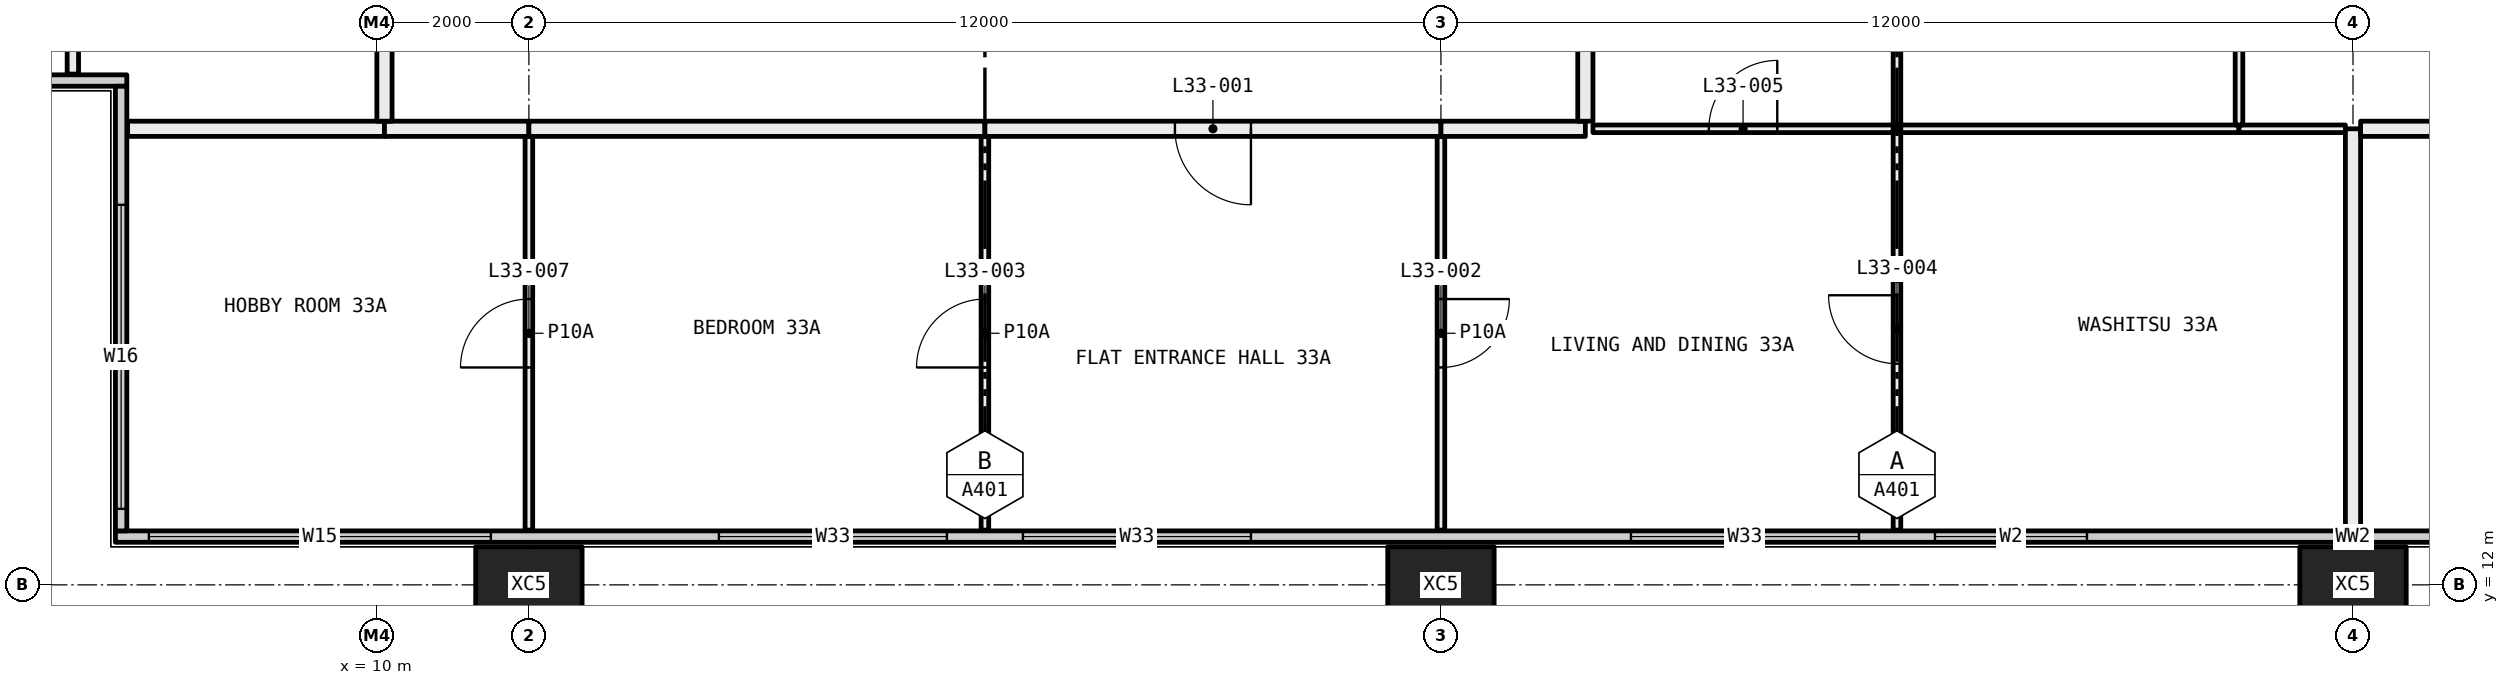
"""IFC4 building model, lengths in metres.
Left out: names, types, materials, properties, quantities, classifications, styles, units other than length and angle.
Written with IfcOpenShell. Run it as: python <this file> out.ifc"""

import sys

from ifc_helpers import new_model, si_unit, direction, frame, frame_2d, origin, origin_2d, place, context, subcontext, project, spatial, rectangle, hollow_rectangle, extrude, element, fill, save


model = new_model("IFC4")
c1 = context("Model", 3, precision=1e-05, world=origin(), true_north=direction((0.0, 1.0)))
c2 = subcontext(c1, "Body", "Model", "MODEL_VIEW")
j1 = project(units=[si_unit("LENGTHUNIT", "METRE"), si_unit("PLANEANGLEUNIT", "RADIAN")], contexts=[c1])
p1 = place(None, origin())
s1 = spatial("IfcSite", under=j1, at=p1, CompositionType="ELEMENT")
p2 = place(p1, origin())
s2 = spatial("IfcBuilding", under=s1, at=p2, CompositionType="ELEMENT")
p3 = place(p2, frame((0.0, 0.0, 127.65)))
s3 = spatial("IfcBuildingStorey", under=s2, at=p3, CompositionType="ELEMENT", Elevation=127.65)
for number, where, z_axis, x_axis in (
    (1, (12.0, 12.0, -0.4), (0.0, 0.0, 1.0), (1.0, 0.0, 0.0)),
    (2, (24.0, 12.0, -0.4), (0.0, 0.0, 1.0), (1.0, 0.0, 0.0)),
    (3, (36.0, 12.0, -0.4), (0.0, 0.0, 1.0), (1.0, 0.0, 0.0)),
):
    element("IfcColumn", number, at=place(p3, frame(where, z_axis=z_axis, x_axis=x_axis)), inside=s3, PredefinedType="COLUMN", context=c2, shape_type="SweptSolid", body=[
        extrude(hollow_rectangle(XDim=1.4, YDim=1.0, WallThickness=0.055, at=origin_2d()), origin(), (0.0, 0.0, 1.0), 3.45),
    ])
p4 = place(p3, frame((6.56, 12.635, 0.0), z_axis=(0.0, 0.0, 1.0), x_axis=(1.0, 0.0, 0.0)))
e4 = element("IfcWall", 4, at=p4, inside=s3, PredefinedType="ELEMENTEDWALL", context=c2, shape_type="SweptSolid", body=[
    extrude(rectangle(XDim=58.88, YDim=0.15, at=frame_2d((29.44, 0.0))), origin(), (0.0, 0.0, 1.0), 3.05),
])
p5 = place(p4, frame((0.44, 0.0, 0.45)))
e5 = element("IfcOpeningElement", 5, at=p5, cuts=e4, PredefinedType="OPENING", context=c2, shape_type="SweptSolid", body=[
    extrude(rectangle(XDim=4.5, YDim=2.55, at=frame_2d((2.25, 1.275))), frame((0.0, 0.085, 0.0), z_axis=(0.0, -1.0, 0.0), x_axis=(1.0, 0.0, 0.0)), (0.0, 0.0, 1.0), 0.17),
])
p6 = place(p4, frame((7.94, 0.0, 0.45)))
e6 = element("IfcOpeningElement", 6, at=p6, cuts=e4, PredefinedType="OPENING", context=c2, shape_type="SweptSolid", body=[
    extrude(rectangle(XDim=3.0, YDim=2.55, at=frame_2d((1.5, 1.275))), frame((0.0, 0.085, 0.0), z_axis=(0.0, -1.0, 0.0), x_axis=(1.0, 0.0, 0.0)), (0.0, 0.0, 1.0), 0.17),
])
p7 = place(p4, frame((11.94, 0.0, 0.45)))
e7 = element("IfcOpeningElement", 7, at=p7, cuts=e4, PredefinedType="OPENING", context=c2, shape_type="SweptSolid", body=[
    extrude(rectangle(XDim=3.0, YDim=2.55, at=frame_2d((1.5, 1.275))), frame((0.0, 0.085, 0.0), z_axis=(0.0, -1.0, 0.0), x_axis=(1.0, 0.0, 0.0)), (0.0, 0.0, 1.0), 0.17),
])
p8 = place(p4, frame((19.94, 0.0, 0.45)))
e8 = element("IfcOpeningElement", 8, at=p8, cuts=e4, PredefinedType="OPENING", context=c2, shape_type="SweptSolid", body=[
    extrude(rectangle(XDim=3.0, YDim=2.55, at=frame_2d((1.5, 1.275))), frame((0.0, 0.085, 0.0), z_axis=(0.0, -1.0, 0.0), x_axis=(1.0, 0.0, 0.0)), (0.0, 0.0, 1.0), 0.17),
])
p9 = place(p4, frame((23.94, 0.0, 0.45)))
e9 = element("IfcOpeningElement", 9, at=p9, cuts=e4, PredefinedType="OPENING", context=c2, shape_type="SweptSolid", body=[
    extrude(rectangle(XDim=2.0, YDim=2.55, at=frame_2d((1.0, 1.275))), frame((0.0, 0.085, 0.0), z_axis=(0.0, -1.0, 0.0), x_axis=(1.0, 0.0, 0.0)), (0.0, 0.0, 1.0), 0.17),
])
p10 = place(p4, frame((31.94, 0.0, 0.45)))
e10 = element("IfcOpeningElement", 10, at=p10, cuts=e4, PredefinedType="OPENING", context=c2, shape_type="SweptSolid", body=[
    extrude(rectangle(XDim=3.0, YDim=2.55, at=frame_2d((1.5, 1.275))), frame((0.0, 0.085, 0.0), z_axis=(0.0, -1.0, 0.0), x_axis=(1.0, 0.0, 0.0)), (0.0, 0.0, 1.0), 0.17),
])
p11 = place(p4, frame((35.94, 0.0, 0.45)))
e11 = element("IfcOpeningElement", 11, at=p11, cuts=e4, PredefinedType="OPENING", context=c2, shape_type="SweptSolid", body=[
    extrude(rectangle(XDim=3.0, YDim=2.55, at=frame_2d((1.5, 1.275))), frame((0.0, 0.085, 0.0), z_axis=(0.0, -1.0, 0.0), x_axis=(1.0, 0.0, 0.0)), (0.0, 0.0, 1.0), 0.17),
])
p12 = place(p4, frame((43.94, 0.0, 0.45)))
e12 = element("IfcOpeningElement", 12, at=p12, cuts=e4, PredefinedType="OPENING", context=c2, shape_type="SweptSolid", body=[
    extrude(rectangle(XDim=3.0, YDim=2.55, at=frame_2d((1.5, 1.275))), frame((0.0, 0.085, 0.0), z_axis=(0.0, -1.0, 0.0), x_axis=(1.0, 0.0, 0.0)), (0.0, 0.0, 1.0), 0.17),
])
p13 = place(p4, frame((47.94, 0.0, 0.45)))
e13 = element("IfcOpeningElement", 13, at=p13, cuts=e4, PredefinedType="OPENING", context=c2, shape_type="SweptSolid", body=[
    extrude(rectangle(XDim=2.0, YDim=2.55, at=frame_2d((1.0, 1.275))), frame((0.0, 0.085, 0.0), z_axis=(0.0, -1.0, 0.0), x_axis=(1.0, 0.0, 0.0)), (0.0, 0.0, 1.0), 0.17),
])
p14 = place(p4, frame((53.94, 0.0, 0.45)))
e14 = element("IfcOpeningElement", 14, at=p14, cuts=e4, PredefinedType="OPENING", context=c2, shape_type="SweptSolid", body=[
    extrude(rectangle(XDim=4.5, YDim=2.55, at=frame_2d((2.25, 1.275))), frame((0.0, 0.085, 0.0), z_axis=(0.0, -1.0, 0.0), x_axis=(1.0, 0.0, 0.0)), (0.0, 0.0, 1.0), 0.17),
])
p15 = place(p3, frame((0.56, 18.635, 0.0), z_axis=(0.0, 0.0, 1.0), x_axis=(1.0, 0.0, 0.0)))
e15 = element("IfcWall", 15, at=p15, inside=s3, PredefinedType="ELEMENTEDWALL", context=c2, shape_type="SweptSolid", body=[
    extrude(rectangle(XDim=6.15, YDim=0.15, at=frame_2d((3.075, 0.0))), origin(), (0.0, 0.0, 1.0), 3.05),
])
p16 = place(p15, frame((0.44, 0.0, 0.45)))
e16 = element("IfcOpeningElement", 16, at=p16, cuts=e15, PredefinedType="OPENING", context=c2, shape_type="SweptSolid", body=[
    extrude(rectangle(XDim=4.0, YDim=2.55, at=frame_2d((2.0, 1.275))), frame((0.0, 0.085, 0.0), z_axis=(0.0, -1.0, 0.0), x_axis=(1.0, 0.0, 0.0)), (0.0, 0.0, 1.0), 0.17),
])
p17 = place(p3, frame((6.635, 12.71, 0.0), z_axis=(0.0, 0.0, 1.0), x_axis=(0.0, 1.0, 0.0)))
e17 = element("IfcWall", 17, at=p17, inside=s3, PredefinedType="ELEMENTEDWALL", context=c2, shape_type="SweptSolid", body=[
    extrude(rectangle(XDim=5.85, YDim=0.15, at=frame_2d((2.925, 0.0))), origin(), (0.0, 0.0, 1.0), 3.05),
])
p18 = place(p17, frame((0.29, 0.0, 0.45)))
e18 = element("IfcOpeningElement", 18, at=p18, cuts=e17, PredefinedType="OPENING", context=c2, shape_type="SweptSolid", body=[
    extrude(rectangle(XDim=4.0, YDim=2.55, at=frame_2d((2.0, 1.275))), frame((0.0, 0.085, 0.0), z_axis=(0.0, -1.0, 0.0), x_axis=(1.0, 0.0, 0.0)), (0.0, 0.0, 1.0), 0.17),
])
p19 = place(p3, frame((12.0, 12.72, 0.0), z_axis=(0.0, 0.0, 1.0), x_axis=(0.0, 1.0, 0.0)))
e19 = element("IfcWall", 19, at=p19, inside=s3, PredefinedType="PARTITIONING", context=c2, shape_type="SweptSolid", body=[
    extrude(rectangle(XDim=5.18, YDim=0.1, at=frame_2d((2.59, 0.0))), origin(), (0.0, 0.0, 1.0), 3.05),
])
p20 = place(p19, frame((2.14, 0.0, 0.0)))
e20 = element("IfcOpeningElement", 20, at=p20, cuts=e19, PredefinedType="OPENING", context=c2, shape_type="SweptSolid", body=[
    extrude(rectangle(XDim=0.9, YDim=2.1, at=frame_2d((0.45, 1.05))), frame((0.0, 0.06, 0.0), z_axis=(0.0, -1.0, 0.0), x_axis=(1.0, 0.0, 0.0)), (0.0, 0.0, 1.0), 0.12),
])
p21 = place(p3, frame((10.1, 18.0, 0.0), z_axis=(0.0, 0.0, 1.0), x_axis=(-1.0, 0.0, 0.0)))
e21 = element("IfcWall", 21, at=p21, inside=s3, PredefinedType="PARTITIONING", context=c2, shape_type="SweptSolid", body=[
    extrude(rectangle(XDim=3.38, YDim=0.2, at=frame_2d((1.69, 0.0))), origin(), (0.0, 0.0, 1.0), 3.05),
])
p22 = place(p3, frame((12.0, 18.0, 0.0), z_axis=(0.0, 0.0, 1.0), x_axis=(-1.0, 0.0, 0.0)))
e22 = element("IfcWall", 22, at=p22, inside=s3, PredefinedType="PARTITIONING", context=c2, shape_type="SweptSolid", body=[
    extrude(rectangle(XDim=1.9, YDim=0.2, at=frame_2d((0.95, 0.0))), origin(), (0.0, 0.0, 1.0), 3.05),
])
p23 = place(p3, frame((18.0, 12.72, 0.0), z_axis=(0.0, 0.0, 1.0), x_axis=(0.0, 1.0, 0.0)))
e23 = element("IfcWall", 23, at=p23, inside=s3, PredefinedType="PARTITIONING", context=c2, shape_type="SweptSolid", body=[
    extrude(rectangle(XDim=5.18, YDim=0.1, at=frame_2d((2.59, 0.0))), origin(), (0.0, 0.0, 1.0), 3.05),
])
p24 = place(p23, frame((2.14, 0.0, 0.0)))
e24 = element("IfcOpeningElement", 24, at=p24, cuts=e23, PredefinedType="OPENING", context=c2, shape_type="SweptSolid", body=[
    extrude(rectangle(XDim=0.9, YDim=2.1, at=frame_2d((0.45, 1.05))), frame((0.0, 0.06, 0.0), z_axis=(0.0, -1.0, 0.0), x_axis=(1.0, 0.0, 0.0)), (0.0, 0.0, 1.0), 0.12),
])
p25 = place(p3, frame((18.0, 18.0, 0.0), z_axis=(0.0, 0.0, 1.0), x_axis=(-1.0, 0.0, 0.0)))
e25 = element("IfcWall", 25, at=p25, inside=s3, PredefinedType="PARTITIONING", context=c2, shape_type="SweptSolid", body=[
    extrude(rectangle(XDim=6.0, YDim=0.2, at=frame_2d((3.0, 0.0))), origin(), (0.0, 0.0, 1.0), 3.05),
])
p26 = place(p3, frame((24.0, 12.72, 0.0), z_axis=(0.0, 0.0, 1.0), x_axis=(0.0, 1.0, 0.0)))
e26 = element("IfcWall", 26, at=p26, inside=s3, PredefinedType="PARTITIONING", context=c2, shape_type="SweptSolid", body=[
    extrude(rectangle(XDim=5.18, YDim=0.1, at=frame_2d((2.59, 0.0))), origin(), (0.0, 0.0, 1.0), 3.05),
])
p27 = place(p26, frame((2.14, 0.0, 0.0)))
e27 = element("IfcOpeningElement", 27, at=p27, cuts=e26, PredefinedType="OPENING", context=c2, shape_type="SweptSolid", body=[
    extrude(rectangle(XDim=0.9, YDim=2.1, at=frame_2d((0.45, 1.05))), frame((0.0, 0.06, 0.0), z_axis=(0.0, -1.0, 0.0), x_axis=(1.0, 0.0, 0.0)), (0.0, 0.0, 1.0), 0.12),
])
p28 = place(p3, frame((24.0, 18.0, 0.0), z_axis=(0.0, 0.0, 1.0), x_axis=(-1.0, 0.0, 0.0)))
e28 = element("IfcWall", 28, at=p28, inside=s3, PredefinedType="PARTITIONING", context=c2, shape_type="SweptSolid", body=[
    extrude(rectangle(XDim=6.0, YDim=0.2, at=frame_2d((3.0, 0.0))), origin(), (0.0, 0.0, 1.0), 3.05),
])
p29 = place(p28, frame((2.5, 0.0, 0.0)))
e29 = element("IfcOpeningElement", 29, at=p29, cuts=e28, PredefinedType="OPENING", context=c2, shape_type="SweptSolid", body=[
    extrude(rectangle(XDim=1.0, YDim=2.1, at=frame_2d((0.5, 1.05))), frame((0.0, 0.11, 0.0), z_axis=(0.0, -1.0, 0.0), x_axis=(1.0, 0.0, 0.0)), (0.0, 0.0, 1.0), 0.22),
])
p30 = place(p3, frame((30.0, 12.72, 0.0), z_axis=(0.0, 0.0, 1.0), x_axis=(0.0, 1.0, 0.0)))
e30 = element("IfcWall", 30, at=p30, inside=s3, PredefinedType="PARTITIONING", context=c2, shape_type="SweptSolid", body=[
    extrude(rectangle(XDim=5.28, YDim=0.1, at=frame_2d((2.64, 0.0))), origin(), (0.0, 0.0, 1.0), 3.05),
])
p31 = place(p30, frame((2.19, 0.0, 0.0)))
e31 = element("IfcOpeningElement", 31, at=p31, cuts=e30, PredefinedType="OPENING", context=c2, shape_type="SweptSolid", body=[
    extrude(rectangle(XDim=0.9, YDim=2.1, at=frame_2d((0.45, 1.05))), frame((0.0, 0.06, 0.0), z_axis=(0.0, -1.0, 0.0), x_axis=(1.0, 0.0, 0.0)), (0.0, 0.0, 1.0), 0.12),
])
p32 = place(p3, frame((29.95, 18.0, 0.0), z_axis=(0.0, 0.0, 1.0), x_axis=(-1.0, 0.0, 0.0)))
e32 = element("IfcWall", 32, at=p32, inside=s3, PredefinedType="PARTITIONING", context=c2, shape_type="SweptSolid", body=[
    extrude(rectangle(XDim=3.95, YDim=0.1, at=frame_2d((1.975, 0.0))), origin(), (0.0, 0.0, 1.0), 3.05),
])
p33 = place(p32, frame((1.525, 0.0, 0.0)))
e33 = element("IfcOpeningElement", 33, at=p33, cuts=e32, PredefinedType="OPENING", context=c2, shape_type="SweptSolid", body=[
    extrude(rectangle(XDim=0.9, YDim=2.1, at=frame_2d((0.45, 1.05))), frame((0.0, 0.06, 0.0), z_axis=(0.0, -1.0, 0.0), x_axis=(1.0, 0.0, 0.0)), (0.0, 0.0, 1.0), 0.12),
])
p34 = place(p3, frame((25.9, 18.0, 0.0), z_axis=(0.0, 0.0, 1.0), x_axis=(-1.0, 0.0, 0.0)))
e34 = element("IfcWall", 34, at=p34, inside=s3, PredefinedType="PARTITIONING", context=c2, shape_type="SweptSolid", body=[
    extrude(rectangle(XDim=1.9, YDim=0.2, at=frame_2d((0.95, 0.0))), origin(), (0.0, 0.0, 1.0), 3.05),
])
p35 = place(p3, frame((34.5, 18.0, 0.0), z_axis=(0.0, 0.0, 1.0), x_axis=(-1.0, 0.0, 0.0)))
e35 = element("IfcWall", 35, at=p35, inside=s3, PredefinedType="PARTITIONING", context=c2, shape_type="SweptSolid", body=[
    extrude(rectangle(XDim=4.45, YDim=0.1, at=frame_2d((2.225, 0.0))), origin(), (0.0, 0.0, 1.0), 3.05),
])
p36 = place(p3, frame((35.9, 18.0, 0.0), z_axis=(0.0, 0.0, 1.0), x_axis=(-1.0, 0.0, 0.0)))
e36 = element("IfcWall", 36, at=p36, inside=s3, PredefinedType="PARTITIONING", context=c2, shape_type="SweptSolid", body=[
    extrude(rectangle(XDim=1.4, YDim=0.1, at=frame_2d((0.7, 0.0))), origin(), (0.0, 0.0, 1.0), 3.05),
])
p37 = place(p3, frame((36.0, 12.72, 0.0), z_axis=(0.0, 0.0, 1.0), x_axis=(0.0, 1.0, 0.0)))
e37 = element("IfcWall", 37, at=p37, inside=s3, PredefinedType="PARTITIONING", context=c2, shape_type="SweptSolid", body=[
    extrude(rectangle(XDim=5.28, YDim=0.2, at=frame_2d((2.64, 0.0))), origin(), (0.0, 0.0, 1.0), 2.45),
])
p38 = place(p3, frame((30.0, 18.05, 0.0), z_axis=(0.0, 0.0, 1.0), x_axis=(0.0, 1.0, 0.0)))
e38 = element("IfcWall", 38, at=p38, inside=s3, PredefinedType="PARTITIONING", context=c2, shape_type="SweptSolid", body=[
    extrude(rectangle(XDim=6.175, YDim=0.1, at=frame_2d((3.087, 0.0))), origin(), (0.0, 0.0, 1.0), 2.45),
])
p39 = place(p38, frame((2.637, 0.0, 0.0)))
e39 = element("IfcOpeningElement", 39, at=p39, cuts=e38, PredefinedType="OPENING", context=c2, shape_type="SweptSolid", body=[
    extrude(rectangle(XDim=0.9, YDim=2.1, at=frame_2d((0.45, 1.05))), frame((0.0, 0.06, 0.0), z_axis=(0.0, -1.0, 0.0), x_axis=(1.0, 0.0, 0.0)), (0.0, 0.0, 1.0), 0.12),
])
p40 = place(p3, frame((25.9, 23.9, 0.0), z_axis=(0.0, 0.0, 1.0), x_axis=(0.0, -1.0, 0.0)))
e40 = element("IfcWall", 40, at=p40, inside=s3, PredefinedType="PARTITIONING", context=c2, shape_type="SweptSolid", body=[
    extrude(rectangle(XDim=5.8, YDim=0.2, at=frame_2d((2.9, 0.0))), origin(), (0.0, 0.0, 1.0), 3.05),
])
p41 = place(p3, frame((34.5, 18.05, 0.0), z_axis=(0.0, 0.0, 1.0), x_axis=(0.0, 1.0, 0.0)))
e41 = element("IfcWall", 41, at=p41, inside=s3, PredefinedType="PARTITIONING", context=c2, shape_type="SweptSolid", body=[
    extrude(rectangle(XDim=6.25, YDim=0.1, at=frame_2d((3.125, 0.0))), origin(), (0.0, 0.0, 1.0), 2.45),
])
p42 = place(p41, frame((2.675, 0.0, 0.0)))
e42 = element("IfcOpeningElement", 42, at=p42, cuts=e41, PredefinedType="OPENING", context=c2, shape_type="SweptSolid", body=[
    extrude(rectangle(XDim=0.9, YDim=2.1, at=frame_2d((0.45, 1.05))), frame((0.0, 0.06, 0.0), z_axis=(0.0, -1.0, 0.0), x_axis=(1.0, 0.0, 0.0)), (0.0, 0.0, 1.0), 0.12),
])
p43 = place(p3, frame((36.1, 18.0, 0.0), z_axis=(0.0, 0.0, 1.0), x_axis=(1.0, 0.0, 0.0)))
e43 = element("IfcWall", 43, at=p43, inside=s3, PredefinedType="PARTITIONING", context=c2, shape_type="SweptSolid", body=[
    extrude(rectangle(XDim=2.3, YDim=0.2, at=frame_2d((1.15, 0.0))), origin(), (0.0, 0.0, 1.0), 3.05),
])
p44 = place(p3, frame((6.0, 18.72, 0.0), z_axis=(0.0, 0.0, 1.0), x_axis=(0.0, 1.0, 0.0)))
e44 = element("IfcWall", 44, at=p44, inside=s3, PredefinedType="PARTITIONING", context=c2, shape_type="SweptSolid", body=[
    extrude(rectangle(XDim=3.78, YDim=0.15, at=frame_2d((1.89, 0.0))), origin(), (0.0, 0.0, 1.0), 3.05),
])
p45 = place(p3, frame((10.1, 18.1, 0.0), z_axis=(0.0, 0.0, 1.0), x_axis=(0.0, 1.0, 0.0)))
e45 = element("IfcWall", 45, at=p45, inside=s3, PredefinedType="PARTITIONING", context=c2, shape_type="SweptSolid", body=[
    extrude(rectangle(XDim=4.4, YDim=0.2, at=frame_2d((2.2, 0.0))), origin(), (0.0, 0.0, 1.0), 3.05),
])
p46 = place(p5, origin())
e46 = element("IfcWindow", 46, at=p46, inside=s3, PartitioningType="SINGLE_PANEL", PredefinedType="WINDOW", context=c2, shape_type="SweptSolid", body=[
    extrude(rectangle(XDim=4.5, YDim=2.55, at=frame_2d((2.25, 1.275))), frame((0.0, 0.03, 0.0), z_axis=(0.0, -1.0, 0.0), x_axis=(1.0, 0.0, 0.0)), (0.0, 0.0, 1.0), 0.06),
])
fill(e5, e46)
p47 = place(p6, origin())
e47 = element("IfcWindow", 47, at=p47, inside=s3, PartitioningType="SINGLE_PANEL", PredefinedType="WINDOW", context=c2, shape_type="SweptSolid", body=[
    extrude(rectangle(XDim=3.0, YDim=2.55, at=frame_2d((1.5, 1.275))), frame((0.0, 0.03, 0.0), z_axis=(0.0, -1.0, 0.0), x_axis=(1.0, 0.0, 0.0)), (0.0, 0.0, 1.0), 0.06),
])
fill(e6, e47)
p48 = place(p7, origin())
e48 = element("IfcWindow", 48, at=p48, inside=s3, PartitioningType="SINGLE_PANEL", PredefinedType="WINDOW", context=c2, shape_type="SweptSolid", body=[
    extrude(rectangle(XDim=3.0, YDim=2.55, at=frame_2d((1.5, 1.275))), frame((0.0, 0.03, 0.0), z_axis=(0.0, -1.0, 0.0), x_axis=(1.0, 0.0, 0.0)), (0.0, 0.0, 1.0), 0.06),
])
fill(e7, e48)
p49 = place(p8, origin())
e49 = element("IfcWindow", 49, at=p49, inside=s3, PartitioningType="SINGLE_PANEL", PredefinedType="WINDOW", context=c2, shape_type="SweptSolid", body=[
    extrude(rectangle(XDim=3.0, YDim=2.55, at=frame_2d((1.5, 1.275))), frame((0.0, 0.03, 0.0), z_axis=(0.0, -1.0, 0.0), x_axis=(1.0, 0.0, 0.0)), (0.0, 0.0, 1.0), 0.06),
])
fill(e8, e49)
p50 = place(p9, origin())
e50 = element("IfcWindow", 50, at=p50, inside=s3, PartitioningType="SINGLE_PANEL", PredefinedType="WINDOW", context=c2, shape_type="SweptSolid", body=[
    extrude(rectangle(XDim=2.0, YDim=2.55, at=frame_2d((1.0, 1.275))), frame((0.0, 0.03, 0.0), z_axis=(0.0, -1.0, 0.0), x_axis=(1.0, 0.0, 0.0)), (0.0, 0.0, 1.0), 0.06),
])
fill(e9, e50)
p51 = place(p18, origin())
e51 = element("IfcWindow", 51, at=p51, inside=s3, PartitioningType="SINGLE_PANEL", PredefinedType="WINDOW", context=c2, shape_type="SweptSolid", body=[
    extrude(rectangle(XDim=4.0, YDim=2.55, at=frame_2d((2.0, 1.275))), frame((0.0, 0.03, 0.0), z_axis=(0.0, -1.0, 0.0), x_axis=(1.0, 0.0, 0.0)), (0.0, 0.0, 1.0), 0.06),
])
fill(e18, e51)
p52 = place(p29, origin())
e52 = element("IfcDoor", 52, at=p52, inside=s3, OperationType="SINGLE_SWING_RIGHT", PredefinedType="DOOR", context=c2, shape_type="SweptSolid", body=[
    extrude(rectangle(XDim=1.0, YDim=2.1, at=frame_2d((0.5, 1.05))), frame((0.0, 0.025, 0.0), z_axis=(0.0, -1.0, 0.0), x_axis=(1.0, 0.0, 0.0)), (0.0, 0.0, 1.0), 0.05),
])
fill(e29, e52)
p53 = place(p27, frame((0.9, 0.0, 0.0), x_axis=(-1.0, 0.0, 0.0)))
e53 = element("IfcDoor", 53, at=p53, inside=s3, OperationType="SINGLE_SWING_RIGHT", PredefinedType="DOOR", context=c2, shape_type="SweptSolid", body=[
    extrude(rectangle(XDim=0.9, YDim=2.1, at=frame_2d((0.45, 1.05))), frame((0.0, 0.025, 0.0), z_axis=(0.0, -1.0, 0.0), x_axis=(1.0, 0.0, 0.0)), (0.0, 0.0, 1.0), 0.05),
])
fill(e27, e53)
p54 = place(p24, origin())
e54 = element("IfcDoor", 54, at=p54, inside=s3, OperationType="SINGLE_SWING_RIGHT", PredefinedType="DOOR", context=c2, shape_type="SweptSolid", body=[
    extrude(rectangle(XDim=0.9, YDim=2.1, at=frame_2d((0.45, 1.05))), frame((0.0, 0.025, 0.0), z_axis=(0.0, -1.0, 0.0), x_axis=(1.0, 0.0, 0.0)), (0.0, 0.0, 1.0), 0.05),
])
fill(e24, e54)
p55 = place(p31, origin())
e55 = element("IfcDoor", 55, at=p55, inside=s3, OperationType="SINGLE_SWING_LEFT", PredefinedType="DOOR", context=c2, shape_type="SweptSolid", body=[
    extrude(rectangle(XDim=0.9, YDim=2.1, at=frame_2d((0.45, 1.05))), frame((0.0, 0.025, 0.0), z_axis=(0.0, -1.0, 0.0), x_axis=(1.0, 0.0, 0.0)), (0.0, 0.0, 1.0), 0.05),
])
fill(e31, e55)
p56 = place(p33, frame((0.9, 0.0, 0.0), x_axis=(-1.0, 0.0, 0.0)))
e56 = element("IfcDoor", 56, at=p56, inside=s3, OperationType="SINGLE_SWING_LEFT", PredefinedType="DOOR", context=c2, shape_type="SweptSolid", body=[
    extrude(rectangle(XDim=0.9, YDim=2.1, at=frame_2d((0.45, 1.05))), frame((0.0, 0.025, 0.0), z_axis=(0.0, -1.0, 0.0), x_axis=(1.0, 0.0, 0.0)), (0.0, 0.0, 1.0), 0.05),
])
fill(e33, e56)
p57 = place(p20, origin())
e57 = element("IfcDoor", 57, at=p57, inside=s3, OperationType="SINGLE_SWING_RIGHT", PredefinedType="DOOR", context=c2, shape_type="SweptSolid", body=[
    extrude(rectangle(XDim=0.9, YDim=2.1, at=frame_2d((0.45, 1.05))), frame((0.0, 0.025, 0.0), z_axis=(0.0, -1.0, 0.0), x_axis=(1.0, 0.0, 0.0)), (0.0, 0.0, 1.0), 0.05),
])
fill(e20, e57)
save(model, sys.argv[1])
